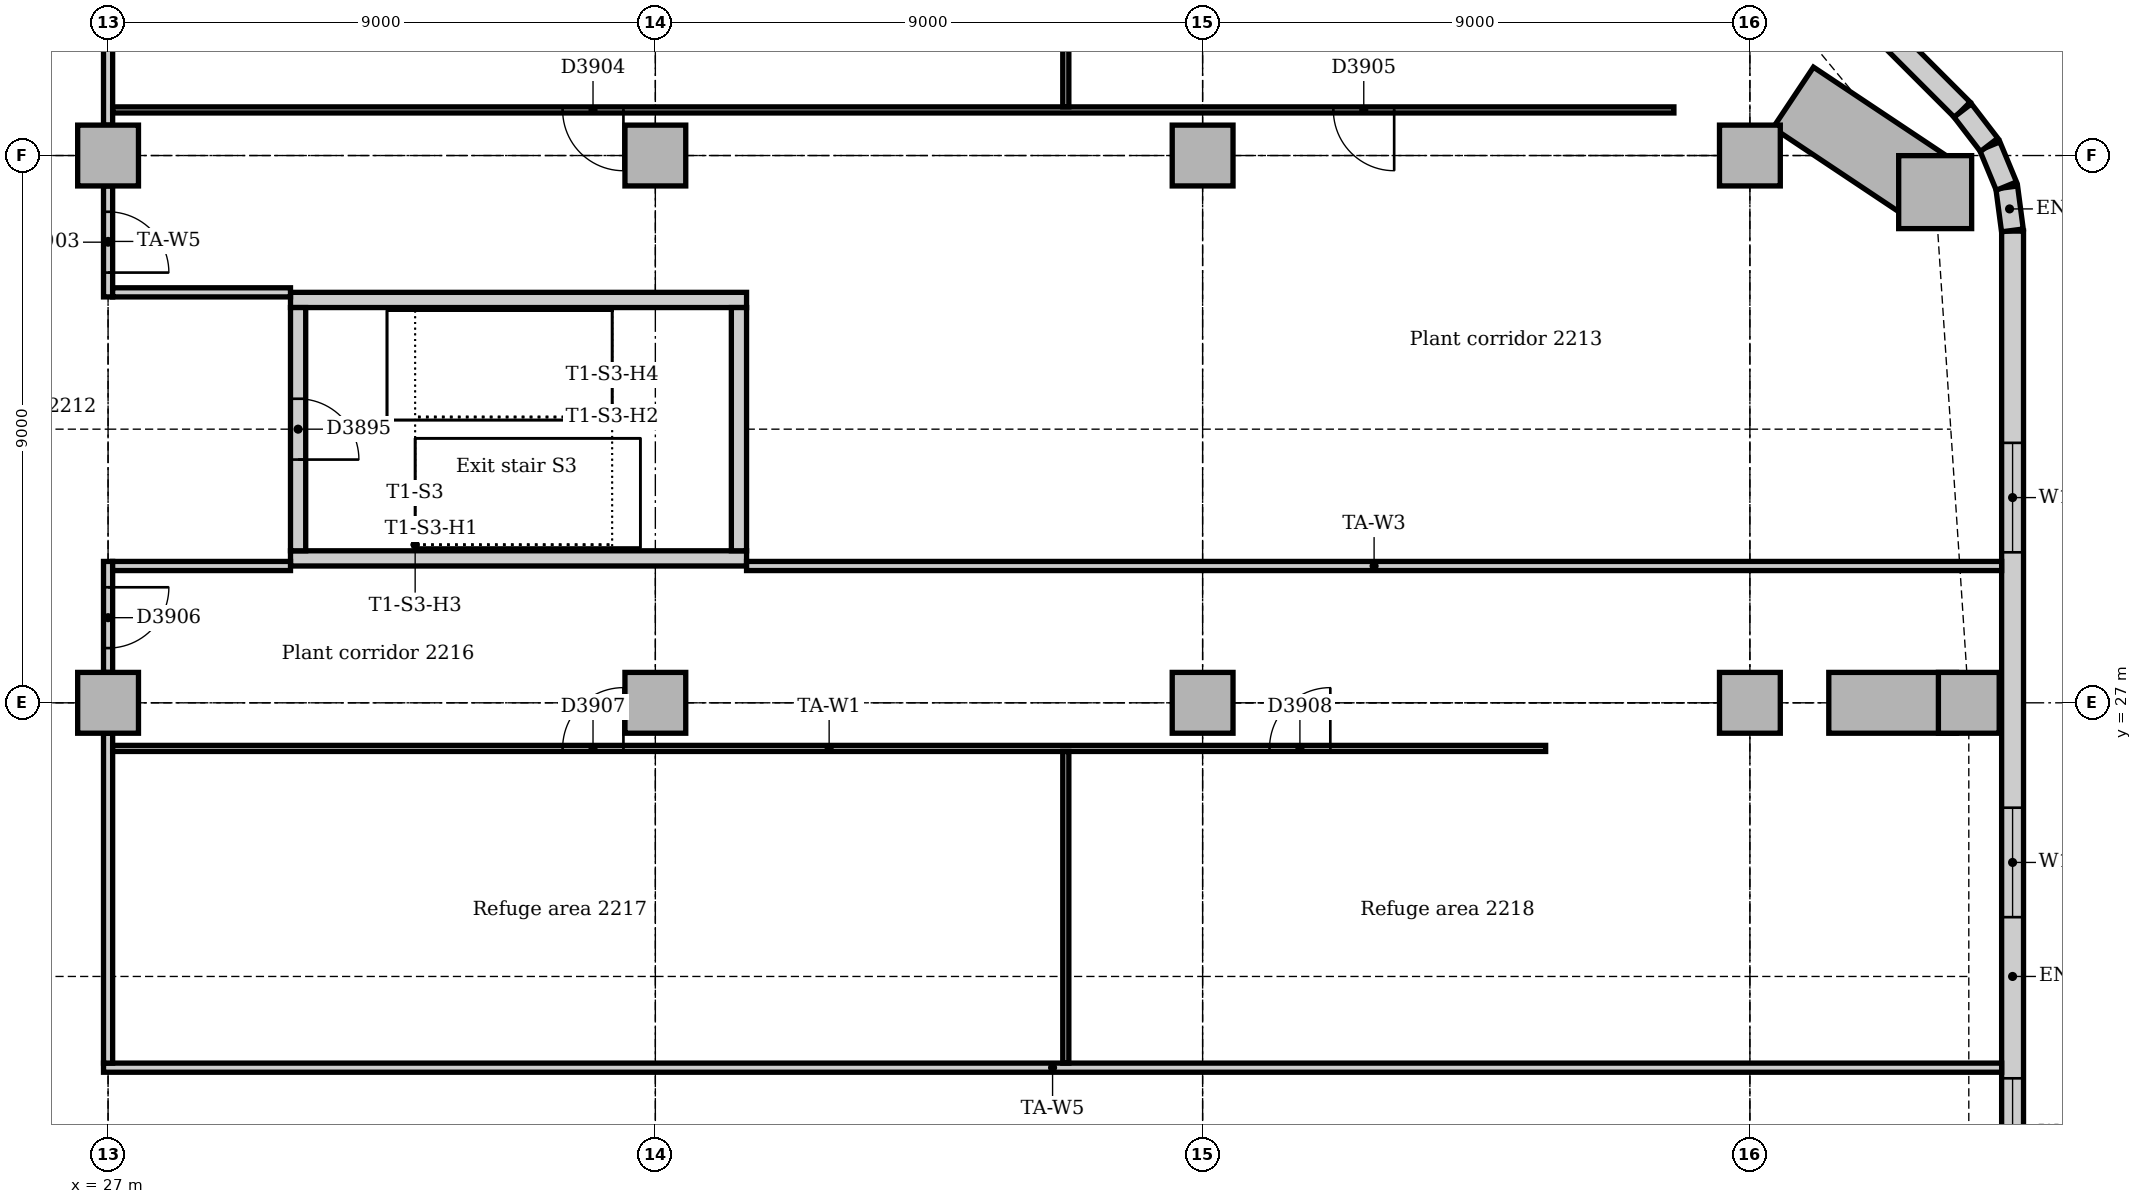
"""IFC4 building model, lengths in metres.
Left out: names, types, materials, properties, quantities, classifications, styles, units other than length and angle.
Written with IfcOpenShell. Run it as: python <this file> out.ifc"""

import sys

from ifc_helpers import new_model, si_unit, direction, frame, frame_2d, origin, origin_2d, place, context, subcontext, project, spatial, rectangle, extrude, element, fill, save


model = new_model("IFC4")
c1 = context("Model", 3, precision=1e-05, world=origin(), true_north=direction((0.0, 1.0)))
c2 = subcontext(c1, "Body", "Model", "MODEL_VIEW")
j1 = project(units=[si_unit("LENGTHUNIT", "METRE"), si_unit("PLANEANGLEUNIT", "RADIAN")], contexts=[c1])
p1 = place(None, origin())
s1 = spatial("IfcSite", under=j1, at=p1, CompositionType="ELEMENT")
p2 = place(p1, origin())
s2 = spatial("IfcBuilding", under=s1, at=p2, CompositionType="ELEMENT")
p3 = place(p2, frame((0.0, 0.0, 95.0)))
s3 = spatial("IfcBuildingStorey", under=s2, at=p3, CompositionType="ELEMENT", Elevation=95.0)
for number, where, z_axis, x_axis in (
    (1, (30.0, 29.375, 0.0), (0.0, 0.0, 1.0), (1.0, 0.0, 0.0)),
    (2, (37.5, 33.625, 0.0), (0.0, 0.0, 1.0), (-1.0, 0.0, 0.0)),
):
    element("IfcWall", number, at=place(p3, frame(where, z_axis=z_axis, x_axis=x_axis)), inside=s3, PredefinedType="SOLIDWALL", context=c2, shape_type="SweptSolid", body=[
        extrude(rectangle(XDim=7.5, YDim=0.25, at=frame_2d((3.75, 0.0))), origin(), (0.0, 0.0, 1.0), 5.0),
    ])
p4 = place(p3, frame((37.375, 29.5, 0.0), z_axis=(0.0, 0.0, 1.0), x_axis=(0.0, 1.0, 0.0)))
e3 = element("IfcWall", 3, at=p4, inside=s3, PredefinedType="SOLIDWALL", context=c2, shape_type="SweptSolid", body=[
    extrude(rectangle(XDim=4.0, YDim=0.25, at=frame_2d((2.0, 0.0))), origin(), (0.0, 0.0, 1.0), 5.0),
])
p5 = place(p3, frame((30.125, 33.5, 0.0), z_axis=(0.0, 0.0, 1.0), x_axis=(0.0, -1.0, 0.0)))
e4 = element("IfcWall", 4, at=p5, inside=s3, PredefinedType="SOLIDWALL", context=c2, shape_type="SweptSolid", body=[
    extrude(rectangle(XDim=4.0, YDim=0.25, at=frame_2d((2.0, 0.0))), origin(), (0.0, 0.0, 1.0), 5.0),
])
p6 = place(p5, frame((1.5, 0.0, 0.0)))
e5 = element("IfcOpeningElement", 5, at=p6, cuts=e4, PredefinedType="OPENING", context=c2, shape_type="SweptSolid", body=[
    extrude(rectangle(XDim=1.0, YDim=2.1, at=frame_2d((0.5, 1.05))), frame((0.0, 0.135, 0.0), z_axis=(0.0, -1.0, 0.0), x_axis=(1.0, 0.0, 0.0)), (0.0, 0.0, 1.0), 0.27),
])
p7 = place(p3, frame((57.047, 35.398, 0.0), z_axis=(0.0, 0.0, 1.0), x_axis=(1.0, 0.0, 0.0)))
e6 = element("IfcColumn", 6, at=p7, inside=s3, PredefinedType="COLUMN", context=c2, shape_type="SweptSolid", body=[
    extrude(rectangle(XDim=1.2, YDim=1.2, at=origin_2d()), origin(), (0.0, 0.0, 1.0), 4.85),
])
for number, where, z_axis, x_axis in (
    (7, (57.6, 27.0, 0.0), (0.0, 0.0, 1.0), (1.0, 0.0, 0.0)),
    (8, (27.0, 27.0, 0.0), (0.0, 0.0, 1.0), (1.0, 0.0, 0.0)),
    (9, (27.0, 36.0, 0.0), (0.0, 0.0, 1.0), (1.0, 0.0, 0.0)),
    (10, (36.0, 27.0, 0.0), (0.0, 0.0, 1.0), (1.0, 0.0, 0.0)),
    (11, (36.0, 36.0, 0.0), (0.0, 0.0, 1.0), (1.0, 0.0, 0.0)),
    (12, (45.0, 27.0, 0.0), (0.0, 0.0, 1.0), (1.0, 0.0, 0.0)),
    (13, (45.0, 36.0, 0.0), (0.0, 0.0, 1.0), (1.0, 0.0, 0.0)),
    (14, (54.0, 27.0, 0.0), (0.0, 0.0, 1.0), (1.0, 0.0, 0.0)),
    (15, (54.0, 36.0, 0.0), (0.0, 0.0, 1.0), (1.0, 0.0, 0.0)),
):
    element("IfcColumn", number, at=place(p3, frame(where, z_axis=z_axis, x_axis=x_axis)), inside=s3, PredefinedType="COLUMN", context=c2, shape_type="SweptSolid", body=[
        extrude(rectangle(XDim=1.0, YDim=1.0, at=origin_2d()), origin(), (0.0, 0.0, 1.0), 4.85),
    ])
p8 = place(p3, frame((58.32, 10.243, 0.0), z_axis=(0.0, 0.0, 1.0), x_axis=(0.0, 1.0, 0.0)))
e16 = element("IfcWall", 16, at=p8, inside=s3, PredefinedType="STANDARD", context=c2, shape_type="SweptSolid", body=[
    extrude(rectangle(XDim=24.515, YDim=0.36, at=frame_2d((12.257, 0.0))), origin(), (0.0, 0.0, 1.0), 4.85),
])
p9 = place(p8, frame((4.957, 0.0, 1.2)))
e17 = element("IfcOpeningElement", 17, at=p9, cuts=e16, PredefinedType="OPENING", context=c2, shape_type="SweptSolid", body=[
    extrude(rectangle(XDim=1.8, YDim=1.2, at=frame_2d((0.9, 0.6))), frame((0.0, 0.19, 0.0), z_axis=(0.0, -1.0, 0.0), x_axis=(1.0, 0.0, 0.0)), (0.0, 0.0, 1.0), 0.38),
])
p10 = place(p8, frame((8.782, 0.0, 0.9)))
e18 = element("IfcOpeningElement", 18, at=p10, cuts=e16, PredefinedType="OPENING", context=c2, shape_type="SweptSolid", body=[
    extrude(rectangle(XDim=1.8, YDim=2.2, at=frame_2d((0.9, 1.1))), frame((0.0, 0.19, 0.0), z_axis=(0.0, -1.0, 0.0), x_axis=(1.0, 0.0, 0.0)), (0.0, 0.0, 1.0), 0.38),
])
p11 = place(p8, frame((13.232, 0.0, 0.9)))
e19 = element("IfcOpeningElement", 19, at=p11, cuts=e16, PredefinedType="OPENING", context=c2, shape_type="SweptSolid", body=[
    extrude(rectangle(XDim=1.8, YDim=2.2, at=frame_2d((0.9, 1.1))), frame((0.0, 0.19, 0.0), z_axis=(0.0, -1.0, 0.0), x_axis=(1.0, 0.0, 0.0)), (0.0, 0.0, 1.0), 0.38),
])
p12 = place(p8, frame((19.232, 0.0, 0.9)))
e20 = element("IfcOpeningElement", 20, at=p12, cuts=e16, PredefinedType="OPENING", context=c2, shape_type="SweptSolid", body=[
    extrude(rectangle(XDim=1.8, YDim=2.2, at=frame_2d((0.9, 1.1))), frame((0.0, 0.19, 0.0), z_axis=(0.0, -1.0, 0.0), x_axis=(1.0, 0.0, 0.0)), (0.0, 0.0, 1.0), 0.38),
])
p13 = place(p3, frame((57.494, 36.751, 0.0), z_axis=(0.0, 0.0, 1.0), x_axis=(-0.707106781187, 0.707106781187, 0.0)))
e21 = element("IfcWall", 21, at=p13, inside=s3, PredefinedType="STANDARD", context=c2, shape_type="SweptSolid", body=[
    extrude(rectangle(XDim=10.243, YDim=0.36, at=frame_2d((5.121, 0.0))), origin(), (0.0, 0.0, 1.0), 3.25),
])
for number, where, z_axis, x_axis in (
    (22, (58.317, 34.769, 0.0), (0.0, 0.0, 1.0), (-0.131, 0.991, 0.0)),
    (23, (58.218, 35.497, 0.0), (0.0, 0.0, 1.0), (-0.383, 0.924, 0.0)),
):
    element("IfcWall", number, at=place(p3, frame(where, z_axis=z_axis, x_axis=x_axis)), inside=s3, PredefinedType="STANDARD", context=c2, shape_type="SweptSolid", body=[
        extrude(rectangle(XDim=0.713, YDim=0.36, at=frame_2d((0.356, 0.0))), origin(), (0.0, 0.0, 1.0), 3.25),
    ])
p14 = place(p3, frame((57.934, 36.175, 0.0), z_axis=(0.0, 0.0, 1.0), x_axis=(-0.608802368033, 0.793321924995, 0.0)))
e24 = element("IfcWall", 24, at=p14, inside=s3, PredefinedType="STANDARD", context=c2, shape_type="SweptSolid", body=[
    extrude(rectangle(XDim=0.713, YDim=0.36, at=frame_2d((0.357, 0.0))), origin(), (0.0, 0.0, 1.0), 3.25),
])
p15 = place(p3, frame((26.925, 21.0, 0.0), z_axis=(0.0, 0.0, 1.0), x_axis=(1.0, 0.0, 0.0)))
e25 = element("IfcWall", 25, at=p15, inside=s3, PredefinedType="PARTITIONING", context=c2, shape_type="SweptSolid", body=[
    extrude(rectangle(XDim=31.215, YDim=0.15, at=frame_2d((15.607, 0.0))), origin(), (0.0, 0.0, 1.0), 4.85),
])
p16 = place(p3, frame((27.0, 33.675, 0.0), z_axis=(0.0, 0.0, 1.0), x_axis=(0.0, 1.0, 0.0)))
e26 = element("IfcWall", 26, at=p16, inside=s3, PredefinedType="PARTITIONING", context=c2, shape_type="SweptSolid", body=[
    extrude(rectangle(XDim=1.825, YDim=0.15, at=frame_2d((0.912, 0.0))), origin(), (0.0, 0.0, 1.0), 4.256),
])
p17 = place(p16, frame((0.4, 0.0, 0.0)))
e27 = element("IfcOpeningElement", 27, at=p17, cuts=e26, PredefinedType="OPENING", context=c2, shape_type="SweptSolid", body=[
    extrude(rectangle(XDim=1.0, YDim=2.1, at=frame_2d((0.5, 1.05))), frame((0.0, 0.085, 0.0), z_axis=(0.0, -1.0, 0.0), x_axis=(1.0, 0.0, 0.0)), (0.0, 0.0, 1.0), 0.17),
])
p18 = place(p3, frame((27.0, 36.5, 0.0), z_axis=(0.0, 0.0, 1.0), x_axis=(0.0, 1.0, 0.0)))
e28 = element("IfcWall", 28, at=p18, inside=s3, PredefinedType="PARTITIONING", context=c2, shape_type="SweptSolid", body=[
    extrude(rectangle(XDim=7.1, YDim=0.15, at=frame_2d((3.55, 0.0))), origin(), (0.0, 0.0, 1.0), 4.256),
])
p19 = place(p3, frame((27.0, 21.075, 0.0), z_axis=(0.0, 0.0, 1.0), x_axis=(0.0, 1.0, 0.0)))
e29 = element("IfcWall", 29, at=p19, inside=s3, PredefinedType="PARTITIONING", context=c2, shape_type="SweptSolid", body=[
    extrude(rectangle(XDim=5.425, YDim=0.15, at=frame_2d((2.712, 0.0))), origin(), (0.0, 0.0, 1.0), 4.256),
])
p20 = place(p3, frame((27.0, 27.5, 0.0), z_axis=(0.0, 0.0, 1.0), x_axis=(0.0, 1.0, 0.0)))
e30 = element("IfcWall", 30, at=p20, inside=s3, PredefinedType="PARTITIONING", context=c2, shape_type="SweptSolid", body=[
    extrude(rectangle(XDim=1.825, YDim=0.15, at=frame_2d((0.912, 0.0))), origin(), (0.0, 0.0, 1.0), 4.256),
])
p21 = place(p20, frame((0.4, 0.0, 0.0)))
e31 = element("IfcOpeningElement", 31, at=p21, cuts=e30, PredefinedType="OPENING", context=c2, shape_type="SweptSolid", body=[
    extrude(rectangle(XDim=1.0, YDim=2.1, at=frame_2d((0.5, 1.05))), frame((0.0, 0.085, 0.0), z_axis=(0.0, -1.0, 0.0), x_axis=(1.0, 0.0, 0.0)), (0.0, 0.0, 1.0), 0.17),
])
for number, where, z_axis, x_axis in (
    (32, (27.075, 29.25, 0.0), (0.0, 0.0, 1.0), (1.0, 0.0, 0.0)),
    (33, (27.075, 33.75, 0.0), (0.0, 0.0, 1.0), (1.0, 0.0, 0.0)),
):
    element("IfcWall", number, at=place(p3, frame(where, z_axis=z_axis, x_axis=x_axis)), inside=s3, PredefinedType="PARTITIONING", context=c2, shape_type="SweptSolid", body=[
        extrude(rectangle(XDim=2.925, YDim=0.15, at=frame_2d((1.462, 0.0))), origin(), (0.0, 0.0, 1.0), 4.85),
    ])
p22 = place(p3, frame((37.5, 29.25, 0.0), z_axis=(0.0, 0.0, 1.0), x_axis=(1.0, 0.0, 0.0)))
e34 = element("IfcWall", 34, at=p22, inside=s3, PredefinedType="PARTITIONING", context=c2, shape_type="SweptSolid", body=[
    extrude(rectangle(XDim=20.64, YDim=0.15, at=frame_2d((10.32, 0.0))), origin(), (0.0, 0.0, 1.0), 4.85),
])
p23 = place(p3, frame((27.075, 26.25, 0.0), z_axis=(0.0, 0.0, 1.0), x_axis=(1.0, 0.0, 0.0)))
e35 = element("IfcWall", 35, at=p23, inside=s3, PredefinedType="PARTITIONING", context=c2, shape_type="SweptSolid", body=[
    extrude(rectangle(XDim=23.566, YDim=0.1, at=frame_2d((11.783, 0.0))), origin(), (0.0, 0.0, 1.0), 4.85),
])
p24 = place(p23, frame((7.4, 0.0, 0.0)))
e36 = element("IfcOpeningElement", 36, at=p24, cuts=e35, PredefinedType="OPENING", context=c2, shape_type="SweptSolid", body=[
    extrude(rectangle(XDim=1.0, YDim=2.1, at=frame_2d((0.5, 1.05))), frame((0.0, 0.06, 0.0), z_axis=(0.0, -1.0, 0.0), x_axis=(1.0, 0.0, 0.0)), (0.0, 0.0, 1.0), 0.12),
])
p25 = place(p23, frame((19.025, 0.0, 0.0)))
e37 = element("IfcOpeningElement", 37, at=p25, cuts=e35, PredefinedType="OPENING", context=c2, shape_type="SweptSolid", body=[
    extrude(rectangle(XDim=1.0, YDim=2.1, at=frame_2d((0.5, 1.05))), frame((0.0, 0.06, 0.0), z_axis=(0.0, -1.0, 0.0), x_axis=(1.0, 0.0, 0.0)), (0.0, 0.0, 1.0), 0.12),
])
p26 = place(p3, frame((27.075, 36.75, 0.0), z_axis=(0.0, 0.0, 1.0), x_axis=(1.0, 0.0, 0.0)))
e38 = element("IfcWall", 38, at=p26, inside=s3, PredefinedType="PARTITIONING", context=c2, shape_type="SweptSolid", body=[
    extrude(rectangle(XDim=25.675, YDim=0.1, at=frame_2d((12.838, 0.0))), origin(), (0.0, 0.0, 1.0), 4.85),
])
p27 = place(p26, frame((7.4, 0.0, 0.0)))
e39 = element("IfcOpeningElement", 39, at=p27, cuts=e38, PredefinedType="OPENING", context=c2, shape_type="SweptSolid", body=[
    extrude(rectangle(XDim=1.0, YDim=2.1, at=frame_2d((0.5, 1.05))), frame((0.0, 0.06, 0.0), z_axis=(0.0, -1.0, 0.0), x_axis=(1.0, 0.0, 0.0)), (0.0, 0.0, 1.0), 0.12),
])
p28 = place(p26, frame((20.075, 0.0, 0.0)))
e40 = element("IfcOpeningElement", 40, at=p28, cuts=e38, PredefinedType="OPENING", context=c2, shape_type="SweptSolid", body=[
    extrude(rectangle(XDim=1.0, YDim=2.1, at=frame_2d((0.5, 1.05))), frame((0.0, 0.06, 0.0), z_axis=(0.0, -1.0, 0.0), x_axis=(1.0, 0.0, 0.0)), (0.0, 0.0, 1.0), 0.12),
])
p29 = place(p3, frame((42.75, 36.8, 0.0), z_axis=(0.0, 0.0, 1.0), x_axis=(0.0, 1.0, 0.0)))
e41 = element("IfcWall", 41, at=p29, inside=s3, PredefinedType="PARTITIONING", context=c2, shape_type="SweptSolid", body=[
    extrude(rectangle(XDim=7.84, YDim=0.1, at=frame_2d((3.92, 0.0))), origin(), (0.0, 0.0, 1.0), 4.85),
])
p30 = place(p3, frame((42.75, 21.075, 0.0), z_axis=(0.0, 0.0, 1.0), x_axis=(0.0, 1.0, 0.0)))
e42 = element("IfcWall", 42, at=p30, inside=s3, PredefinedType="PARTITIONING", context=c2, shape_type="SweptSolid", body=[
    extrude(rectangle(XDim=5.125, YDim=0.1, at=frame_2d((2.562, 0.0))), origin(), (0.0, 0.0, 1.0), 4.85),
])
p31 = place(p10, origin())
e43 = element("IfcWindow", 43, at=p31, inside=s3, PartitioningType="SINGLE_PANEL", PredefinedType="WINDOW", context=c2, shape_type="SweptSolid", body=[
    extrude(rectangle(XDim=1.8, YDim=2.2, at=frame_2d((0.9, 1.1))), frame((0.0, 0.13, 0.0), z_axis=(0.0, -1.0, 0.0), x_axis=(1.0, 0.0, 0.0)), (0.0, 0.0, 1.0), 0.06),
])
fill(e18, e43)
p32 = place(p11, origin())
e44 = element("IfcWindow", 44, at=p32, inside=s3, PartitioningType="SINGLE_PANEL", PredefinedType="WINDOW", context=c2, shape_type="SweptSolid", body=[
    extrude(rectangle(XDim=1.8, YDim=2.2, at=frame_2d((0.9, 1.1))), frame((0.0, 0.13, 0.0), z_axis=(0.0, -1.0, 0.0), x_axis=(1.0, 0.0, 0.0)), (0.0, 0.0, 1.0), 0.06),
])
fill(e19, e44)
p33 = place(p12, origin())
e45 = element("IfcWindow", 45, at=p33, inside=s3, PartitioningType="SINGLE_PANEL", PredefinedType="WINDOW", context=c2, shape_type="SweptSolid", body=[
    extrude(rectangle(XDim=1.8, YDim=2.2, at=frame_2d((0.9, 1.1))), frame((0.0, 0.13, 0.0), z_axis=(0.0, -1.0, 0.0), x_axis=(1.0, 0.0, 0.0)), (0.0, 0.0, 1.0), 0.06),
])
fill(e20, e45)
p34 = place(p6, origin())
e46 = element("IfcDoor", 46, at=p34, inside=s3, OperationType="SINGLE_SWING_RIGHT", PredefinedType="DOOR", context=c2, shape_type="SweptSolid", body=[
    extrude(rectangle(XDim=1.0, YDim=2.1, at=frame_2d((0.5, 1.05))), frame((0.0, 0.025, 0.0), z_axis=(0.0, -1.0, 0.0), x_axis=(1.0, 0.0, 0.0)), (0.0, 0.0, 1.0), 0.05),
])
fill(e5, e46)
p35 = place(p17, frame((1.0, 0.0, 0.0), z_axis=(0.0, 0.0, 1.0), x_axis=(-1.0, 0.0, 0.0)))
e47 = element("IfcDoor", 47, at=p35, inside=s3, OperationType="SINGLE_SWING_RIGHT", PredefinedType="DOOR", context=c2, shape_type="SweptSolid", body=[
    extrude(rectangle(XDim=1.0, YDim=2.1, at=frame_2d((0.5, 1.05))), frame((0.0, 0.025, 0.0), z_axis=(0.0, -1.0, 0.0), x_axis=(1.0, 0.0, 0.0)), (0.0, 0.0, 1.0), 0.05),
])
fill(e27, e47)
p36 = place(p27, frame((1.0, 0.0, 0.0), z_axis=(0.0, 0.0, 1.0), x_axis=(-1.0, 0.0, 0.0)))
e48 = element("IfcDoor", 48, at=p36, inside=s3, OperationType="SINGLE_SWING_LEFT", PredefinedType="DOOR", context=c2, shape_type="SweptSolid", body=[
    extrude(rectangle(XDim=1.0, YDim=2.1, at=frame_2d((0.5, 1.05))), frame((0.0, 0.025, 0.0), z_axis=(0.0, -1.0, 0.0), x_axis=(1.0, 0.0, 0.0)), (0.0, 0.0, 1.0), 0.05),
])
fill(e39, e48)
p37 = place(p28, frame((1.0, 0.0, 0.0), z_axis=(0.0, 0.0, 1.0), x_axis=(-1.0, 0.0, 0.0)))
e49 = element("IfcDoor", 49, at=p37, inside=s3, OperationType="SINGLE_SWING_LEFT", PredefinedType="DOOR", context=c2, shape_type="SweptSolid", body=[
    extrude(rectangle(XDim=1.0, YDim=2.1, at=frame_2d((0.5, 1.05))), frame((0.0, 0.025, 0.0), z_axis=(0.0, -1.0, 0.0), x_axis=(1.0, 0.0, 0.0)), (0.0, 0.0, 1.0), 0.05),
])
fill(e40, e49)
p38 = place(p21, frame((1.0, 0.0, 0.0), z_axis=(0.0, 0.0, 1.0), x_axis=(-1.0, 0.0, 0.0)))
e50 = element("IfcDoor", 50, at=p38, inside=s3, OperationType="SINGLE_SWING_LEFT", PredefinedType="DOOR", context=c2, shape_type="SweptSolid", body=[
    extrude(rectangle(XDim=1.0, YDim=2.1, at=frame_2d((0.5, 1.05))), frame((0.0, 0.025, 0.0), z_axis=(0.0, -1.0, 0.0), x_axis=(1.0, 0.0, 0.0)), (0.0, 0.0, 1.0), 0.05),
])
fill(e31, e50)
p39 = place(p24, origin())
e51 = element("IfcDoor", 51, at=p39, inside=s3, OperationType="SINGLE_SWING_RIGHT", PredefinedType="DOOR", context=c2, shape_type="SweptSolid", body=[
    extrude(rectangle(XDim=1.0, YDim=2.1, at=frame_2d((0.5, 1.05))), frame((0.0, 0.025, 0.0), z_axis=(0.0, -1.0, 0.0), x_axis=(1.0, 0.0, 0.0)), (0.0, 0.0, 1.0), 0.05),
])
fill(e36, e51)
p40 = place(p25, origin())
e52 = element("IfcDoor", 52, at=p40, inside=s3, OperationType="SINGLE_SWING_RIGHT", PredefinedType="DOOR", context=c2, shape_type="SweptSolid", body=[
    extrude(rectangle(XDim=1.0, YDim=2.1, at=frame_2d((0.5, 1.05))), frame((0.0, 0.025, 0.0), z_axis=(0.0, -1.0, 0.0), x_axis=(1.0, 0.0, 0.0)), (0.0, 0.0, 1.0), 0.05),
])
fill(e37, e52)
save(model, sys.argv[1])
